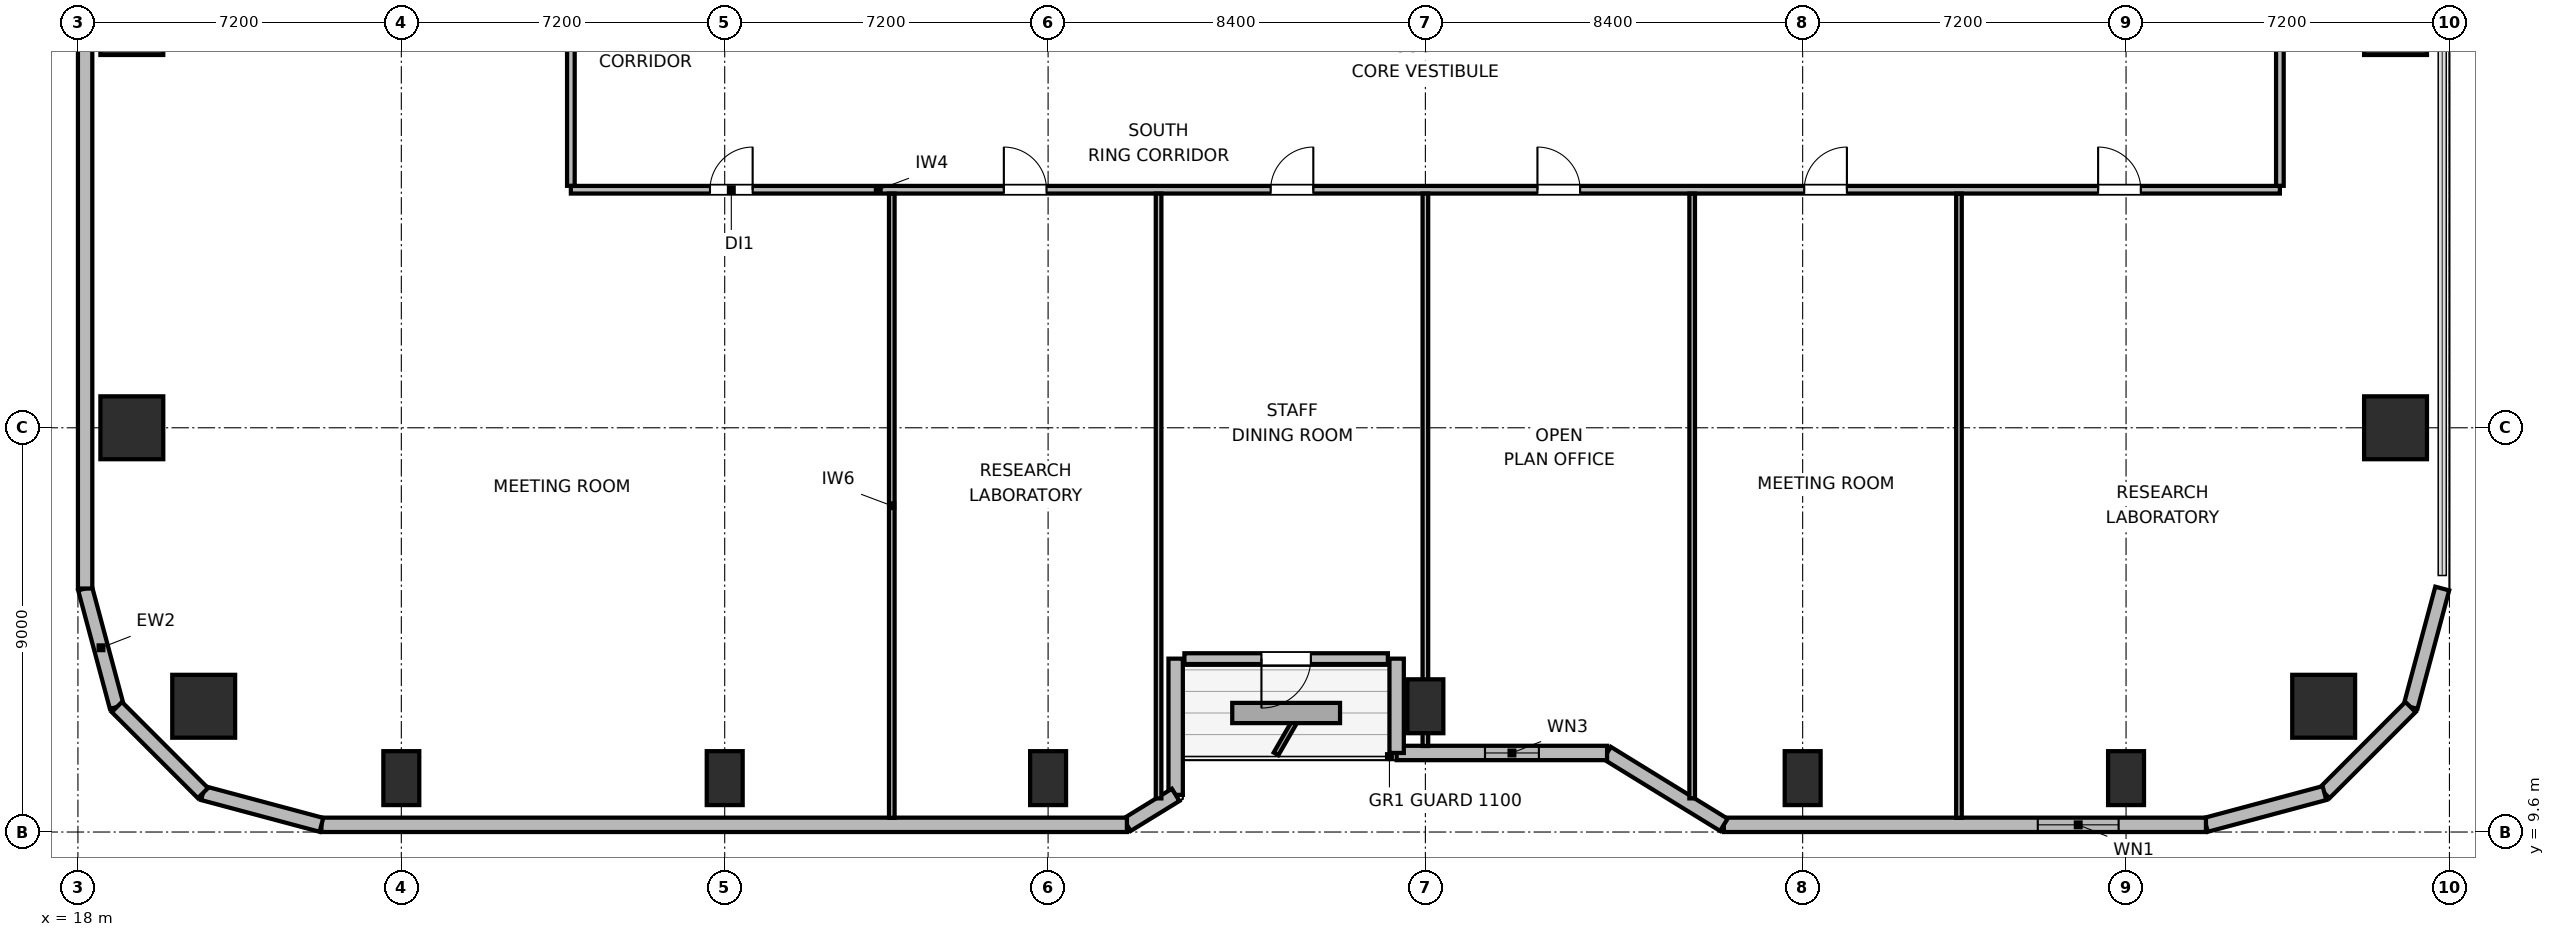
"""IFC4 building model, lengths in metres.
Left out: names, types, materials, properties, quantities, classifications, styles, units other than length and angle.
Written with IfcOpenShell. Run it as: python <this file> out.ifc"""

import sys

from ifc_helpers import new_model, si_unit, direction, frame, frame_2d, origin, origin_2d, place, context, subcontext, project, spatial, rectangle, circle, extrude, element, fill, save


model = new_model("IFC4")
c1 = context("Model", 3, precision=1e-05, world=origin(), true_north=direction((0.0, 1.0)))
c2 = subcontext(c1, "Body", "Model", "MODEL_VIEW")
j1 = project(units=[si_unit("LENGTHUNIT", "METRE"), si_unit("PLANEANGLEUNIT", "RADIAN")], contexts=[c1])
p1 = place(None, origin())
s1 = spatial("IfcSite", under=j1, at=p1, CompositionType="ELEMENT")
p2 = place(p1, origin())
s2 = spatial("IfcBuilding", under=s1, at=p2, CompositionType="ELEMENT")
p3 = place(p2, frame((0.0, 0.0, 97.5)))
s3 = spatial("IfcBuildingStorey", under=s2, at=p3, CompositionType="ELEMENT", Elevation=97.5)
for number, where, z_axis, x_axis in (
    (1, (20.8, 12.4, 0.0), (0.0, 0.0, 1.0), (1.0, 0.0, 0.0)),
    (2, (68.0, 12.4, 0.0), (0.0, 0.0, 1.0), (1.0, 0.0, 0.0)),
):
    element("IfcColumn", number, at=place(p3, frame(where, z_axis=z_axis, x_axis=x_axis)), inside=s3, PredefinedType="COLUMN", context=c2, shape_type="SweptSolid", body=[
        extrude(circle(Radius=0.7, at=origin_2d()), origin(), (0.0, 0.0, 1.0), 3.9),
    ])
for number, where, z_axis, x_axis in (
    (3, (25.2, 10.8, 0.0), (0.0, 0.0, 1.0), (1.0, 0.0, 0.0)),
    (4, (32.4, 10.8, 0.0), (0.0, 0.0, 1.0), (1.0, 0.0, 0.0)),
    (5, (39.6, 10.8, 0.0), (0.0, 0.0, 1.0), (1.0, 0.0, 0.0)),
    (6, (48.0, 12.4, 0.0), (0.0, 0.0, 1.0), (1.0, 0.0, 0.0)),
    (7, (56.4, 10.8, 0.0), (0.0, 0.0, 1.0), (1.0, 0.0, 0.0)),
    (8, (63.6, 10.8, 0.0), (0.0, 0.0, 1.0), (1.0, 0.0, 0.0)),
):
    element("IfcColumn", number, at=place(p3, frame(where, z_axis=z_axis, x_axis=x_axis)), inside=s3, PredefinedType="COLUMN", context=c2, shape_type="SweptSolid", body=[
        extrude(rectangle(XDim=0.8, YDim=1.2, at=origin_2d()), origin(), (0.0, 0.0, 1.0), 3.9),
    ])
for number, where, z_axis, x_axis in (
    (9, (19.2, 18.6, 0.0), (0.0, 0.0, 1.0), (1.0, 0.0, 0.0)),
    (10, (69.6, 18.6, 0.0), (0.0, 0.0, 1.0), (1.0, 0.0, 0.0)),
    (11, (19.2, 27.6, 0.0), (0.0, 0.0, 1.0), (1.0, 0.0, 0.0)),
    (12, (69.6, 27.6, 0.0), (0.0, 0.0, 1.0), (1.0, 0.0, 0.0)),
):
    element("IfcColumn", number, at=place(p3, frame(where, z_axis=z_axis, x_axis=x_axis)), inside=s3, PredefinedType="COLUMN", context=c2, shape_type="SweptSolid", body=[
        extrude(rectangle(XDim=1.4, YDim=1.4, at=origin_2d()), origin(), (0.0, 0.0, 1.0), 3.9),
    ])
p4 = place(p3, frame((18.866, 12.383, 0.0), z_axis=(0.0, 0.0, 1.0), x_axis=(-0.25869736047, 0.965958423373, 0.0)))
e13 = element("IfcWall", 13, at=p4, inside=s3, PredefinedType="SOLIDWALL", context=c2, shape_type="SweptSolid", body=[
    extrude(rectangle(XDim=2.731, YDim=0.32, at=frame_2d((1.366, 0.0))), origin(), (0.0, 0.0, 1.0), 3.64),
])
p5 = place(p3, frame((18.16, 15.021, 0.0), z_axis=(0.0, 0.0, 1.0), x_axis=(0.0, 1.0, 0.0)))
e14 = element("IfcWall", 14, at=p5, inside=s3, PredefinedType="SOLIDWALL", context=c2, shape_type="SweptSolid", body=[
    extrude(rectangle(XDim=14.219, YDim=0.32, at=frame_2d((7.109, 0.0))), origin(), (0.0, 0.0, 1.0), 3.64),
])
p6 = place(p3, frame((70.64, 15.021, 0.0), z_axis=(0.0, 0.0, 1.0), x_axis=(-0.258613949072, -0.965980758269, 0.0)))
e15 = element("IfcWall", 15, at=p6, inside=s3, PredefinedType="SOLIDWALL", context=c2, shape_type="SweptSolid", body=[
    extrude(rectangle(XDim=2.731, YDim=0.32, at=frame_2d((1.366, 0.0))), origin(), (0.0, 0.0, 1.0), 3.64),
])
p7 = place(p3, frame((69.934, 12.383, 0.0), z_axis=(0.0, 0.0, 1.0), x_axis=(-0.707151821269, -0.707061738235, 0.0)))
e16 = element("IfcWall", 16, at=p7, inside=s3, PredefinedType="SOLIDWALL", context=c2, shape_type="SweptSolid", body=[
    extrude(rectangle(XDim=2.71, YDim=0.32, at=frame_2d((1.355, 0.0))), origin(), (0.0, 0.0, 1.0), 3.64),
])
p8 = place(p3, frame((68.017, 10.467, 0.0), z_axis=(0.0, 0.0, 1.0), x_axis=(-0.965958423373, -0.25869736047, 0.0)))
e17 = element("IfcWall", 17, at=p8, inside=s3, PredefinedType="SOLIDWALL", context=c2, shape_type="SweptSolid", body=[
    extrude(rectangle(XDim=2.731, YDim=0.32, at=frame_2d((1.366, 0.0))), origin(), (0.0, 0.0, 1.0), 3.64),
])
p9 = place(p3, frame((65.379, 9.76, 0.0), z_axis=(0.0, 0.0, 1.0), x_axis=(-1.0, 0.0, 0.0)))
e18 = element("IfcWall", 18, at=p9, inside=s3, PredefinedType="SOLIDWALL", context=c2, shape_type="SweptSolid", body=[
    extrude(rectangle(XDim=10.734, YDim=0.32, at=frame_2d((5.367, 0.0))), origin(), (0.0, 0.0, 1.0), 3.64),
])
p10 = place(p9, frame((1.944, 0.0, 0.85)))
e19 = element("IfcOpeningElement", 19, at=p10, cuts=e18, PredefinedType="OPENING", context=c2, shape_type="SweptSolid", body=[
    extrude(rectangle(XDim=1.8, YDim=1.1, at=frame_2d((0.9, 0.55))), frame((0.0, 0.17, 0.0), z_axis=(0.0, -1.0, 0.0), x_axis=(1.0, 0.0, 0.0)), (0.0, 0.0, 1.0), 0.34),
])
p11 = place(p3, frame((54.645, 9.76, 0.0), z_axis=(0.0, 0.0, 1.0), x_axis=(-0.851630857047, 0.524142044989, 0.0)))
e20 = element("IfcWall", 20, at=p11, inside=s3, PredefinedType="SOLIDWALL", context=c2, shape_type="SweptSolid", body=[
    extrude(rectangle(XDim=3.053, YDim=0.32, at=frame_2d((1.526, 0.0))), origin(), (0.0, 0.0, 1.0), 2.875),
])
p12 = place(p3, frame((52.045, 11.36, 0.0), z_axis=(0.0, 0.0, 1.0), x_axis=(-1.0, 0.0, 0.0)))
e21 = element("IfcWall", 21, at=p12, inside=s3, PredefinedType="SOLIDWALL", context=c2, shape_type="SweptSolid", body=[
    extrude(rectangle(XDim=4.685, YDim=0.32, at=frame_2d((2.343, 0.0))), origin(), (0.0, 0.0, 1.0), 2.875),
])
p13 = place(p12, frame((1.518, 0.0, 0.85)))
e22 = element("IfcOpeningElement", 22, at=p13, cuts=e21, PredefinedType="OPENING", context=c2, shape_type="SweptSolid", body=[
    extrude(rectangle(XDim=1.2, YDim=1.1, at=frame_2d((0.6, 0.55))), frame((0.0, 0.17, 0.0), z_axis=(0.0, -1.0, 0.0), x_axis=(1.0, 0.0, 0.0)), (0.0, 0.0, 1.0), 0.34),
])
p14 = place(p3, frame((47.36, 11.36, 0.0), z_axis=(0.0, 0.0, 1.0), x_axis=(0.0, 1.0, 0.0)))
e23 = element("IfcWall", 23, at=p14, inside=s3, PredefinedType="SOLIDWALL", context=c2, shape_type="SweptSolid", body=[
    extrude(rectangle(XDim=2.1, YDim=0.32, at=frame_2d((1.05, 0.0))), origin(), (0.0, 0.0, 1.0), 2.875),
])
p15 = place(p3, frame((47.165, 13.46, 0.0), z_axis=(0.0, 0.0, 1.0), x_axis=(-1.0, 0.0, 0.0)))
e24 = element("IfcWall", 24, at=p15, inside=s3, PredefinedType="SOLIDWALL", context=c2, shape_type="SweptSolid", body=[
    extrude(rectangle(XDim=4.53, YDim=0.24, at=frame_2d((2.265, 0.0))), origin(), (0.0, 0.0, 1.0), 3.64),
])
p16 = place(p15, frame((1.715, 0.0, 0.0)))
e25 = element("IfcOpeningElement", 25, at=p16, cuts=e24, PredefinedType="OPENING", context=c2, shape_type="SweptSolid", body=[
    extrude(rectangle(XDim=1.1, YDim=2.04, at=frame_2d((0.55, 1.02))), frame((0.0, 0.13, 0.0), z_axis=(0.0, -1.0, 0.0), x_axis=(1.0, 0.0, 0.0)), (0.0, 0.0, 1.0), 0.26),
])
p17 = place(p3, frame((42.44, 13.46, 0.0), z_axis=(0.0, 0.0, 1.0), x_axis=(0.0, -1.0, 0.0)))
e26 = element("IfcWall", 26, at=p17, inside=s3, PredefinedType="SOLIDWALL", context=c2, shape_type="SweptSolid", body=[
    extrude(rectangle(XDim=3.032, YDim=0.32, at=frame_2d((1.516, 0.0))), origin(), (0.0, 0.0, 1.0), 2.875),
])
p18 = place(p3, frame((42.44, 10.427, 0.0), z_axis=(0.0, 0.0, 1.0), x_axis=(-0.851776724646, -0.523904964045, 0.0)))
e27 = element("IfcWall", 27, at=p18, inside=s3, PredefinedType="SOLIDWALL", context=c2, shape_type="SweptSolid", body=[
    extrude(rectangle(XDim=1.274, YDim=0.32, at=frame_2d((0.637, 0.0))), origin(), (0.0, 0.0, 1.0), 3.64),
])
p19 = place(p3, frame((41.355, 9.76, 0.0), z_axis=(0.0, 0.0, 1.0), x_axis=(-1.0, 0.0, 0.0)))
e28 = element("IfcWall", 28, at=p19, inside=s3, PredefinedType="SOLIDWALL", context=c2, shape_type="SweptSolid", body=[
    extrude(rectangle(XDim=17.934, YDim=0.32, at=frame_2d((8.967, 0.0))), origin(), (0.0, 0.0, 1.0), 3.64),
])
p20 = place(p3, frame((23.421, 9.76, 0.0), z_axis=(0.0, 0.0, 1.0), x_axis=(-0.965964405026, 0.25867502435, 0.0)))
e29 = element("IfcWall", 29, at=p20, inside=s3, PredefinedType="SOLIDWALL", context=c2, shape_type="SweptSolid", body=[
    extrude(rectangle(XDim=2.731, YDim=0.32, at=frame_2d((1.366, 0.0))), origin(), (0.0, 0.0, 1.0), 3.64),
])
p21 = place(p3, frame((20.783, 10.467, 0.0), z_axis=(0.0, 0.0, 1.0), x_axis=(-0.707106781187, 0.707106781187, 0.0)))
e30 = element("IfcWall", 30, at=p21, inside=s3, PredefinedType="SOLIDWALL", context=c2, shape_type="SweptSolid", body=[
    extrude(rectangle(XDim=2.71, YDim=0.32, at=frame_2d((1.355, 0.0))), origin(), (0.0, 0.0, 1.0), 3.64),
])
p22 = place(p3, frame((28.975, 23.9, 0.0), z_axis=(0.0, 0.0, 1.0), x_axis=(1.0, 0.0, 0.0)))
e31 = element("IfcWall", 31, at=p22, inside=s3, PredefinedType="PARTITIONING", context=c2, shape_type="SweptSolid", body=[
    extrude(rectangle(XDim=38.05, YDim=0.17, at=frame_2d((19.025, 0.0))), origin(), (0.0, 0.0, 1.0), 3.64),
])
p23 = place(p22, frame((3.097, 0.0, 0.0)))
e32 = element("IfcOpeningElement", 32, at=p23, cuts=e31, PredefinedType="OPENING", context=c2, shape_type="SweptSolid", body=[
    extrude(rectangle(XDim=0.95, YDim=2.04, at=frame_2d((0.475, 1.02))), frame((0.0, 0.095, 0.0), z_axis=(0.0, -1.0, 0.0), x_axis=(1.0, 0.0, 0.0)), (0.0, 0.0, 1.0), 0.19),
])
p24 = place(p22, frame((9.64, 0.0, 0.0)))
e33 = element("IfcOpeningElement", 33, at=p24, cuts=e31, PredefinedType="OPENING", context=c2, shape_type="SweptSolid", body=[
    extrude(rectangle(XDim=0.95, YDim=2.04, at=frame_2d((0.475, 1.02))), frame((0.0, 0.095, 0.0), z_axis=(0.0, -1.0, 0.0), x_axis=(1.0, 0.0, 0.0)), (0.0, 0.0, 1.0), 0.19),
])
p25 = place(p22, frame((15.58, 0.0, 0.0)))
e34 = element("IfcOpeningElement", 34, at=p25, cuts=e31, PredefinedType="OPENING", context=c2, shape_type="SweptSolid", body=[
    extrude(rectangle(XDim=0.95, YDim=2.04, at=frame_2d((0.475, 1.02))), frame((0.0, 0.095, 0.0), z_axis=(0.0, -1.0, 0.0), x_axis=(1.0, 0.0, 0.0)), (0.0, 0.0, 1.0), 0.19),
])
p26 = place(p22, frame((21.52, 0.0, 0.0)))
e35 = element("IfcOpeningElement", 35, at=p26, cuts=e31, PredefinedType="OPENING", context=c2, shape_type="SweptSolid", body=[
    extrude(rectangle(XDim=0.95, YDim=2.04, at=frame_2d((0.475, 1.02))), frame((0.0, 0.095, 0.0), z_axis=(0.0, -1.0, 0.0), x_axis=(1.0, 0.0, 0.0)), (0.0, 0.0, 1.0), 0.19),
])
p27 = place(p22, frame((27.46, 0.0, 0.0)))
e36 = element("IfcOpeningElement", 36, at=p27, cuts=e31, PredefinedType="OPENING", context=c2, shape_type="SweptSolid", body=[
    extrude(rectangle(XDim=0.95, YDim=2.04, at=frame_2d((0.475, 1.02))), frame((0.0, 0.095, 0.0), z_axis=(0.0, -1.0, 0.0), x_axis=(1.0, 0.0, 0.0)), (0.0, 0.0, 1.0), 0.19),
])
p28 = place(p22, frame((34.003, 0.0, 0.0)))
e37 = element("IfcOpeningElement", 37, at=p28, cuts=e31, PredefinedType="OPENING", context=c2, shape_type="SweptSolid", body=[
    extrude(rectangle(XDim=0.95, YDim=2.04, at=frame_2d((0.475, 1.02))), frame((0.0, 0.095, 0.0), z_axis=(0.0, -1.0, 0.0), x_axis=(1.0, 0.0, 0.0)), (0.0, 0.0, 1.0), 0.19),
])
p29 = place(p3, frame((28.975, 23.987, 0.0), z_axis=(0.0, 0.0, 1.0), x_axis=(0.0, 1.0, 0.0)))
e38 = element("IfcWall", 38, at=p29, inside=s3, PredefinedType="PARTITIONING", context=c2, shape_type="SweptSolid", body=[
    extrude(rectangle(XDim=24.026, YDim=0.17, at=frame_2d((12.013, 0.0))), origin(), (0.0, 0.0, 1.0), 3.64),
])
p30 = place(p29, frame((11.538, 0.0, 0.0)))
e39 = element("IfcOpeningElement", 39, at=p30, cuts=e38, PredefinedType="OPENING", context=c2, shape_type="SweptSolid", body=[
    extrude(rectangle(XDim=0.95, YDim=2.04, at=frame_2d((0.475, 1.02))), frame((0.0, 0.095, 0.0), z_axis=(0.0, -1.0, 0.0), x_axis=(1.0, 0.0, 0.0)), (0.0, 0.0, 1.0), 0.19),
])
p31 = place(p3, frame((67.025, 23.987, 0.0), z_axis=(0.0, 0.0, 1.0), x_axis=(0.0, 1.0, 0.0)))
e40 = element("IfcWall", 40, at=p31, inside=s3, PredefinedType="PARTITIONING", context=c2, shape_type="SweptSolid", body=[
    extrude(rectangle(XDim=24.026, YDim=0.17, at=frame_2d((12.013, 0.0))), origin(), (0.0, 0.0, 1.0), 3.64),
])
p32 = place(p31, frame((6.088, 0.0, 0.0)))
e41 = element("IfcOpeningElement", 41, at=p32, cuts=e40, PredefinedType="OPENING", context=c2, shape_type="SweptSolid", body=[
    extrude(rectangle(XDim=0.95, YDim=2.04, at=frame_2d((0.475, 1.02))), frame((0.0, 0.095, 0.0), z_axis=(0.0, -1.0, 0.0), x_axis=(1.0, 0.0, 0.0)), (0.0, 0.0, 1.0), 0.19),
])
p33 = place(p31, frame((18.188, 0.0, 0.0)))
e42 = element("IfcOpeningElement", 42, at=p33, cuts=e40, PredefinedType="OPENING", context=c2, shape_type="SweptSolid", body=[
    extrude(rectangle(XDim=0.95, YDim=2.04, at=frame_2d((0.475, 1.02))), frame((0.0, 0.095, 0.0), z_axis=(0.0, -1.0, 0.0), x_axis=(1.0, 0.0, 0.0)), (0.0, 0.0, 1.0), 0.19),
])
p34 = place(p3, frame((36.12, 9.915, 0.0), z_axis=(0.0, 0.0, 1.0), x_axis=(0.0, 1.0, 0.0)))
e43 = element("IfcWall", 43, at=p34, inside=s3, PredefinedType="PARTITIONING", context=c2, shape_type="SweptSolid", body=[
    extrude(rectangle(XDim=13.898, YDim=0.125, at=frame_2d((6.949, 0.0))), origin(), (0.0, 0.0, 1.0), 3.64),
])
p35 = place(p3, frame((42.06, 10.349, 0.0), z_axis=(0.0, 0.0, 1.0), x_axis=(0.0, 1.0, 0.0)))
e44 = element("IfcWall", 44, at=p35, inside=s3, PredefinedType="PARTITIONING", context=c2, shape_type="SweptSolid", body=[
    extrude(rectangle(XDim=13.464, YDim=0.125, at=frame_2d((6.732, 0.0))), origin(), (0.0, 0.0, 1.0), 3.003),
])
p36 = place(p3, frame((48.0, 11.515, 0.0), z_axis=(0.0, 0.0, 1.0), x_axis=(0.0, 1.0, 0.0)))
e45 = element("IfcWall", 45, at=p36, inside=s3, PredefinedType="PARTITIONING", context=c2, shape_type="SweptSolid", body=[
    extrude(rectangle(XDim=12.298, YDim=0.125, at=frame_2d((6.149, 0.0))), origin(), (0.0, 0.0, 1.0), 3.003),
])
p37 = place(p3, frame((53.94, 10.349, 0.0), z_axis=(0.0, 0.0, 1.0), x_axis=(0.0, 1.0, 0.0)))
e46 = element("IfcWall", 46, at=p37, inside=s3, PredefinedType="PARTITIONING", context=c2, shape_type="SweptSolid", body=[
    extrude(rectangle(XDim=13.464, YDim=0.125, at=frame_2d((6.732, 0.0))), origin(), (0.0, 0.0, 1.0), 3.003),
])
p38 = place(p3, frame((59.88, 9.915, 0.0), z_axis=(0.0, 0.0, 1.0), x_axis=(0.0, 1.0, 0.0)))
e47 = element("IfcWall", 47, at=p38, inside=s3, PredefinedType="PARTITIONING", context=c2, shape_type="SweptSolid", body=[
    extrude(rectangle(XDim=13.898, YDim=0.125, at=frame_2d((6.949, 0.0))), origin(), (0.0, 0.0, 1.0), 3.64),
])
p39 = place(p10, origin())
e48 = element("IfcWindow", 48, at=p39, inside=s3, PartitioningType="SINGLE_PANEL", PredefinedType="WINDOW", context=c2, shape_type="SweptSolid", body=[
    extrude(rectangle(XDim=1.8, YDim=1.1, at=frame_2d((0.9, 0.55))), frame((0.0, 0.03, 0.0), z_axis=(0.0, -1.0, 0.0), x_axis=(1.0, 0.0, 0.0)), (0.0, 0.0, 1.0), 0.06),
])
fill(e19, e48)
p40 = place(p13, origin())
e49 = element("IfcWindow", 49, at=p40, inside=s3, PartitioningType="SINGLE_PANEL", PredefinedType="WINDOW", context=c2, shape_type="SweptSolid", body=[
    extrude(rectangle(XDim=1.2, YDim=1.1, at=frame_2d((0.6, 0.55))), frame((0.0, 0.03, 0.0), z_axis=(0.0, -1.0, 0.0), x_axis=(1.0, 0.0, 0.0)), (0.0, 0.0, 1.0), 0.06),
])
fill(e22, e49)
p41 = place(p16, origin())
e50 = element("IfcDoor", 50, at=p41, inside=s3, OperationType="SINGLE_SWING_RIGHT", PredefinedType="DOOR", context=c2, shape_type="SweptSolid", body=[
    extrude(rectangle(XDim=1.1, YDim=2.04, at=frame_2d((0.55, 1.02))), frame((0.0, 0.025, 0.0), z_axis=(0.0, -1.0, 0.0), x_axis=(1.0, 0.0, 0.0)), (0.0, 0.0, 1.0), 0.05),
])
fill(e25, e50)
p42 = place(p23, origin())
e51 = element("IfcDoor", 51, at=p42, inside=s3, OperationType="SINGLE_SWING_RIGHT", PredefinedType="DOOR", context=c2, shape_type="SweptSolid", body=[
    extrude(rectangle(XDim=0.95, YDim=2.04, at=frame_2d((0.475, 1.02))), frame((0.0, 0.025, 0.0), z_axis=(0.0, -1.0, 0.0), x_axis=(1.0, 0.0, 0.0)), (0.0, 0.0, 1.0), 0.05),
])
fill(e32, e51)
p43 = place(p24, origin())
e52 = element("IfcDoor", 52, at=p43, inside=s3, OperationType="SINGLE_SWING_LEFT", PredefinedType="DOOR", context=c2, shape_type="SweptSolid", body=[
    extrude(rectangle(XDim=0.95, YDim=2.04, at=frame_2d((0.475, 1.02))), frame((0.0, 0.025, 0.0), z_axis=(0.0, -1.0, 0.0), x_axis=(1.0, 0.0, 0.0)), (0.0, 0.0, 1.0), 0.05),
])
fill(e33, e52)
p44 = place(p25, origin())
e53 = element("IfcDoor", 53, at=p44, inside=s3, OperationType="SINGLE_SWING_RIGHT", PredefinedType="DOOR", context=c2, shape_type="SweptSolid", body=[
    extrude(rectangle(XDim=0.95, YDim=2.04, at=frame_2d((0.475, 1.02))), frame((0.0, 0.025, 0.0), z_axis=(0.0, -1.0, 0.0), x_axis=(1.0, 0.0, 0.0)), (0.0, 0.0, 1.0), 0.05),
])
fill(e34, e53)
p45 = place(p26, origin())
e54 = element("IfcDoor", 54, at=p45, inside=s3, OperationType="SINGLE_SWING_LEFT", PredefinedType="DOOR", context=c2, shape_type="SweptSolid", body=[
    extrude(rectangle(XDim=0.95, YDim=2.04, at=frame_2d((0.475, 1.02))), frame((0.0, 0.025, 0.0), z_axis=(0.0, -1.0, 0.0), x_axis=(1.0, 0.0, 0.0)), (0.0, 0.0, 1.0), 0.05),
])
fill(e35, e54)
p46 = place(p27, origin())
e55 = element("IfcDoor", 55, at=p46, inside=s3, OperationType="SINGLE_SWING_RIGHT", PredefinedType="DOOR", context=c2, shape_type="SweptSolid", body=[
    extrude(rectangle(XDim=0.95, YDim=2.04, at=frame_2d((0.475, 1.02))), frame((0.0, 0.025, 0.0), z_axis=(0.0, -1.0, 0.0), x_axis=(1.0, 0.0, 0.0)), (0.0, 0.0, 1.0), 0.05),
])
fill(e36, e55)
p47 = place(p28, origin())
e56 = element("IfcDoor", 56, at=p47, inside=s3, OperationType="SINGLE_SWING_LEFT", PredefinedType="DOOR", context=c2, shape_type="SweptSolid", body=[
    extrude(rectangle(XDim=0.95, YDim=2.04, at=frame_2d((0.475, 1.02))), frame((0.0, 0.025, 0.0), z_axis=(0.0, -1.0, 0.0), x_axis=(1.0, 0.0, 0.0)), (0.0, 0.0, 1.0), 0.05),
])
fill(e37, e56)
save(model, sys.argv[1])
